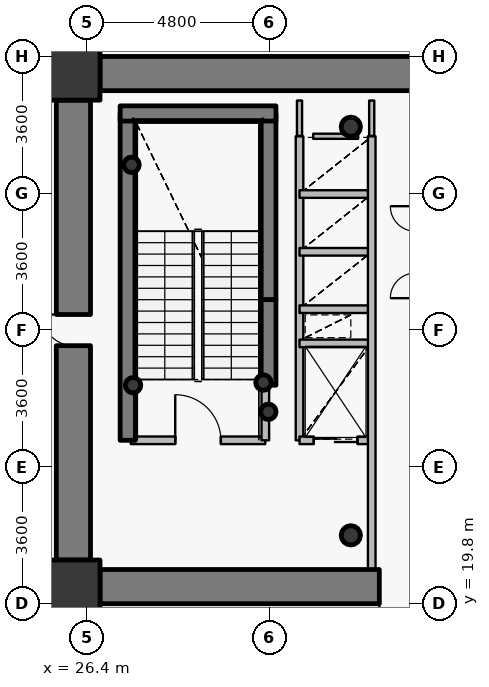
"""IFC4 building model, lengths in metres.
Left out: names, types, materials, properties, quantities, classifications, styles, units other than length and angle.
Written with IfcOpenShell. Run it as: python <this file> out.ifc"""

import sys

from ifc_helpers import new_model, si_unit, direction, frame, frame_2d, origin, origin_2d, place, context, subcontext, project, spatial, rectangle, hollow_circle, extrude, source, transform, mapped, element, fill, save


model = new_model("IFC4")
c1 = context("Model", 3, precision=1e-05, world=origin(), true_north=direction((0.0, 1.0)))
c2 = subcontext(c1, "Body", "Model", "MODEL_VIEW")
j1 = project(units=[si_unit("LENGTHUNIT", "METRE"), si_unit("PLANEANGLEUNIT", "RADIAN")], contexts=[c1])
p1 = place(None, origin())
s1 = spatial("IfcSite", under=j1, at=p1, CompositionType="ELEMENT")
p2 = place(p1, origin())
s2 = spatial("IfcBuilding", under=s1, at=p2, CompositionType="ELEMENT")
p3 = place(p2, frame((0.0, 0.0, 45.0)))
s3 = spatial("IfcBuildingStorey", under=s2, at=p3, CompositionType="ELEMENT", Elevation=45.0)
for number, where, z_axis, x_axis in (
    (1, (26.05, 20.25, 0.0), (0.0, 0.0, 1.0), (1.0, 0.0, 0.0)),
    (2, (26.05, 33.75, 0.0), (0.0, 0.0, 1.0), (1.0, 0.0, 0.0)),
):
    element("IfcColumn", number, at=place(p3, frame(where, z_axis=z_axis, x_axis=x_axis)), inside=s3, PredefinedType="COLUMN", context=c2, shape_type="SweptSolid", body=[
        extrude(rectangle(XDim=1.4, YDim=1.4, at=origin_2d()), origin(), (0.0, 0.0, 1.0), 4.2),
    ])
for number, where, z_axis, x_axis in (
    (3, (33.35, 21.6, 0.0), (0.0, 0.0, 1.0), (1.0, 0.0, 0.0)),
    (4, (33.35, 32.35, 0.0), (0.0, 0.0, 1.0), (1.0, 0.0, 0.0)),
):
    element("IfcColumn", number, at=place(p3, frame(where, z_axis=z_axis, x_axis=x_axis)), inside=s3, PredefinedType="COLUMN", context=c2, shape_type="SweptSolid", body=[
        extrude(hollow_circle(Radius=0.254, WallThickness=0.02, at=origin_2d()), origin(), (0.0, 0.0, 1.0), 4.2),
    ])
p4 = place(p3, frame((27.48, 24.1, 0.0), z_axis=(0.0, 0.0, 1.0), x_axis=(0.0, 1.0, 0.0)))
e5 = element("IfcWall", 5, at=p4, inside=s3, PredefinedType="SHEAR", context=c2, shape_type="SweptSolid", body=[
    extrude(rectangle(XDim=8.6, YDim=0.4, at=frame_2d((4.3, 0.0))), origin(), (0.0, 0.0, 1.0), 4.2),
])
p5 = place(p3, frame((31.18, 27.8, 0.0), z_axis=(0.0, 0.0, 1.0), x_axis=(0.0, 1.0, 0.0)))
e6 = element("IfcWall", 6, at=p5, inside=s3, PredefinedType="SHEAR", context=c2, shape_type="SweptSolid", body=[
    extrude(rectangle(XDim=4.9, YDim=0.4, at=frame_2d((2.45, 0.0))), origin(), (0.0, 0.0, 1.0), 4.2),
])
p6 = place(p3, frame((27.28, 32.7, 0.0), z_axis=(0.0, 0.0, 1.0), x_axis=(1.0, 0.0, 0.0)))
e7 = element("IfcWall", 7, at=p6, inside=s3, PredefinedType="SHEAR", context=c2, shape_type="SweptSolid", body=[
    extrude(rectangle(XDim=4.1, YDim=0.4, at=frame_2d((2.05, 0.0))), origin(), (0.0, 0.0, 1.0), 4.2),
])
for number, where, z_axis, x_axis in (
    (8, (27.58, 31.35, 0.0), (0.0, 0.0, 1.0), (1.0, 0.0, 0.0)),
    (9, (31.05, 25.62, 0.0), (0.0, 0.0, 1.0), (1.0, 0.0, 0.0)),
    (10, (31.18, 24.85, 0.0), (0.0, 0.0, 1.0), (1.0, 0.0, 0.0)),
    (11, (27.62, 25.55, 0.0), (0.0, 0.0, 1.0), (1.0, 0.0, 0.0)),
):
    element("IfcColumn", number, at=place(p3, frame(where, z_axis=z_axis, x_axis=x_axis)), inside=s3, PredefinedType="COLUMN", context=c2, shape_type="SweptSolid", body=[
        extrude(hollow_circle(Radius=0.203, WallThickness=0.016, at=origin_2d()), origin(), (0.0, 0.0, 1.0), 4.2),
    ])
p7 = place(p3, frame((26.75, 33.75, 0.0), z_axis=(0.0, 0.0, 1.0), x_axis=(1.0, 0.0, 0.0)))
e12 = element("IfcWall", 12, at=p7, inside=s3, PredefinedType="SHEAR", context=c2, shape_type="SweptSolid", body=[
    extrude(rectangle(XDim=18.5, YDim=0.9, at=frame_2d((9.25, 0.0))), origin(), (0.0, 0.0, 1.0), 3.4),
])
p8 = place(p3, frame((45.25, 20.25, 0.0), z_axis=(0.0, 0.0, 1.0), x_axis=(-1.0, 0.0, 0.0)))
e13 = element("IfcWall", 13, at=p8, inside=s3, PredefinedType="SHEAR", context=c2, shape_type="SweptSolid", body=[
    extrude(rectangle(XDim=18.5, YDim=0.9, at=frame_2d((9.25, 0.0))), origin(), (0.0, 0.0, 1.0), 3.4),
])
p9 = place(p8, frame((10.0, 0.0, 0.0)))
e14 = element("IfcOpeningElement", 14, at=p9, cuts=e13, PredefinedType="OPENING", context=c2, shape_type="SweptSolid", body=[
    extrude(rectangle(XDim=1.15, YDim=2.15, at=origin_2d()), frame((0.575, 0.46, 1.075), z_axis=(0.0, -1.0, 0.0), x_axis=(1.0, 0.0, 0.0)), (0.0, 0.0, 1.0), 0.92),
])
p10 = place(p3, frame((26.05, 20.95, 0.0), z_axis=(0.0, 0.0, 1.0), x_axis=(0.0, 1.0, 0.0)))
e15 = element("IfcWall", 15, at=p10, inside=s3, PredefinedType="SHEAR", context=c2, shape_type="SweptSolid", body=[
    extrude(rectangle(XDim=12.1, YDim=0.9, at=frame_2d((6.05, 0.0))), origin(), (0.0, 0.0, 1.0), 3.4),
])
p11 = place(p10, frame((5.64, 0.0, 0.0)))
e16 = element("IfcOpeningElement", 16, at=p11, cuts=e15, PredefinedType="OPENING", context=c2, shape_type="SweptSolid", body=[
    extrude(rectangle(XDim=0.82, YDim=2.1, at=origin_2d()), frame((0.41, 0.46, 1.05), z_axis=(0.0, -1.0, 0.0), x_axis=(1.0, 0.0, 0.0)), (0.0, 0.0, 1.0), 0.92),
])
p12 = place(p3, frame((31.18, 25.55, 0.0), z_axis=(0.0, 0.0, 1.0), x_axis=(0.0, 1.0, 0.0)))
e17 = element("IfcWall", 17, at=p12, inside=s3, PredefinedType="SHEAR", context=c2, shape_type="SweptSolid", body=[
    extrude(rectangle(XDim=2.25, YDim=0.4, at=frame_2d((1.125, 0.0))), origin(), (0.0, 0.0, 1.0), 3.55),
])
p13 = place(p3, frame((27.56, 24.1, 0.0), z_axis=(0.0, 0.0, 1.0), x_axis=(1.0, 0.0, 0.0)))
e18 = element("IfcWall", 18, at=p13, inside=s3, PredefinedType="PARTITIONING", context=c2, shape_type="SweptSolid", body=[
    extrude(rectangle(XDim=3.54, YDim=0.2, at=frame_2d((1.77, 0.0))), origin(), (0.0, 0.0, 1.0), 3.95),
])
p14 = place(p13, frame((1.17, 0.0, 0.0)))
e19 = element("IfcOpeningElement", 19, at=p14, cuts=e18, PredefinedType="OPENING", context=c2, shape_type="SweptSolid", body=[
    extrude(rectangle(XDim=1.2, YDim=2.15, at=origin_2d()), frame((0.6, 0.11, 1.075), z_axis=(0.0, -1.0, 0.0), x_axis=(1.0, 0.0, 0.0)), (0.0, 0.0, 1.0), 0.22),
])
p15 = place(p3, frame((31.1, 24.1, 0.0), z_axis=(0.0, 0.0, 1.0), x_axis=(0.0, 1.0, 0.0)))
e20 = element("IfcWall", 20, at=p15, inside=s3, PredefinedType="PARTITIONING", context=c2, shape_type="SweptSolid", body=[
    extrude(rectangle(XDim=1.44, YDim=0.2, at=frame_2d((0.72, 0.0))), origin(), (0.0, 0.0, 1.0), 3.95),
])
p16 = place(p3, frame((32.0, 24.1, 0.0), z_axis=(0.0, 0.0, 1.0), x_axis=(0.0, 1.0, 0.0)))
e21 = element("IfcWall", 21, at=p16, inside=s3, PredefinedType="PARTITIONING", context=c2, shape_type="SweptSolid", body=[
    extrude(rectangle(XDim=8.0, YDim=0.2, at=frame_2d((4.0, 0.0))), origin(), (0.0, 0.0, 1.0), 3.95),
])
p17 = place(p3, frame((32.0, 24.1, 0.0), z_axis=(0.0, 0.0, 1.0), x_axis=(1.0, 0.0, 0.0)))
e22 = element("IfcWall", 22, at=p17, inside=s3, PredefinedType="PARTITIONING", context=c2, shape_type="SweptSolid", body=[
    extrude(rectangle(XDim=1.9, YDim=0.2, at=frame_2d((0.95, 0.0))), origin(), (0.0, 0.0, 1.0), 3.535),
])
p18 = place(p17, frame((0.375, 0.0, 0.0)))
e23 = element("IfcOpeningElement", 23, at=p18, cuts=e22, PredefinedType="OPENING", context=c2, shape_type="SweptSolid", body=[
    extrude(rectangle(XDim=1.15, YDim=2.15, at=origin_2d()), frame((0.575, 0.11, 1.075), z_axis=(0.0, -1.0, 0.0), x_axis=(1.0, 0.0, 0.0)), (0.0, 0.0, 1.0), 0.22),
])
for number, where, z_axis, x_axis in (
    (24, (32.0, 26.65, 0.0), (0.0, 0.0, 1.0), (1.0, 0.0, 0.0)),
    (25, (32.0, 27.55, 0.0), (0.0, 0.0, 1.0), (1.0, 0.0, 0.0)),
    (26, (32.0, 29.06, 0.0), (0.0, 0.0, 1.0), (1.0, 0.0, 0.0)),
    (27, (32.0, 30.58, 0.0), (0.0, 0.0, 1.0), (1.0, 0.0, 0.0)),
):
    element("IfcWall", number, at=place(p3, frame(where, z_axis=z_axis, x_axis=x_axis)), inside=s3, PredefinedType="PARTITIONING", context=c2, shape_type="SweptSolid", body=[
        extrude(rectangle(XDim=1.9, YDim=0.2, at=frame_2d((0.95, 0.0))), origin(), (0.0, 0.0, 1.0), 3.535),
    ])
p19 = place(p3, frame((33.9, 20.7, 0.0), z_axis=(0.0, 0.0, 1.0), x_axis=(0.0, 1.0, 0.0)))
e28 = element("IfcWall", 28, at=p19, inside=s3, PredefinedType="PARTITIONING", context=c2, shape_type="SweptSolid", body=[
    extrude(rectangle(XDim=11.4, YDim=0.2, at=frame_2d((5.7, 0.0))), origin(), (0.0, 0.0, 1.0), 3.535),
])
p20 = place(p3, frame((32.36, 32.1, 0.0), z_axis=(0.0, 0.0, 1.0), x_axis=(1.0, 0.0, 0.0)))
e29 = element("IfcWall", 29, at=p20, inside=s3, PredefinedType="PARTITIONING", context=c2, shape_type="SweptSolid", body=[
    extrude(rectangle(XDim=1.18, YDim=0.135, at=frame_2d((0.59, 0.0))), origin(), (0.0, 0.0, 1.0), 3.535),
])
p21 = place(p3, frame((32.0, 33.04, 0.0), z_axis=(0.0, 0.0, 1.0), x_axis=(0.0, -1.0, 0.0)))
e30 = element("IfcWall", 30, at=p21, inside=s3, PredefinedType="PARTITIONING", context=c2, shape_type="SweptSolid", body=[
    extrude(rectangle(XDim=0.93, YDim=0.135, at=frame_2d((0.465, 0.0))), origin(), (0.0, 0.0, 1.0), 3.485),
])
p22 = place(p3, frame((33.9, 32.11, 0.0), z_axis=(0.0, 0.0, 1.0), x_axis=(0.0, 1.0, 0.0)))
e31 = element("IfcWall", 31, at=p22, inside=s3, PredefinedType="PARTITIONING", context=c2, shape_type="SweptSolid", body=[
    extrude(rectangle(XDim=0.93, YDim=0.135, at=frame_2d((0.465, 0.0))), origin(), (0.0, 0.0, 1.0), 3.535),
])
p23 = place(p3, frame((25.95, 38.893, 0.0), z_axis=(0.0, 0.0, 1.0), x_axis=(0.0, -1.0, 0.0)))
e32 = element("IfcWall", 32, at=p23, inside=s3, PredefinedType="PARTITIONING", context=c2, shape_type="SweptSolid", body=[
    extrude(rectangle(XDim=4.693, YDim=0.135, at=frame_2d((2.346, 0.0))), origin(), (0.0, 0.0, 1.0), 3.285),
])
for number, where, z_axis, x_axis in (
    (33, (25.6, 34.2, 0.0), (0.0, 0.0, 1.0), (0.0, -1.0, 0.0)),
    (34, (25.6, 20.94, 0.0), (0.0, 0.0, 1.0), (0.0, -1.0, 0.0)),
):
    element("IfcWall", number, at=place(p3, frame(where, z_axis=z_axis, x_axis=x_axis)), inside=s3, PredefinedType="PARTITIONING", context=c2, shape_type="SweptSolid", body=[
        extrude(rectangle(XDim=1.14, YDim=0.135, at=frame_2d((0.57, 0.0))), origin(), (0.0, 0.0, 1.0), 3.95),
    ])
p24 = place(p3, frame((25.907, 19.8, 0.0), z_axis=(0.0, 0.0, 1.0), x_axis=(1.0, 0.0, 0.0)))
e35 = element("IfcWall", 35, at=p24, inside=s3, PredefinedType="PARTITIONING", context=c2, shape_type="SweptSolid", body=[
    extrude(rectangle(XDim=0.833, YDim=0.135, at=frame_2d((0.416, 0.0))), origin(), (0.0, 0.0, 1.0), 3.285),
])
m1 = source(origin(), c2, "Body", "SweptSolid", [
    extrude(rectangle(XDim=0.82, YDim=2.1, at=origin_2d()), frame((0.41, 0.025, 1.05), z_axis=(0.0, -1.0, 0.0), x_axis=(1.0, 0.0, 0.0)), (0.0, 0.0, 1.0), 0.05),
])
p25 = place(p11, origin())
e36 = element("IfcDoor", 36, at=p25, inside=s3, OperationType="SINGLE_SWING_RIGHT", PredefinedType="DOOR", context=c2, shape_type="MappedRepresentation", body=[
    mapped(m1, transform((0.0, 0.0, 0.0), x_axis=(1.0, 0.0, 0.0), y_axis=(0.0, 1.0, 0.0), z_axis=(0.0, 0.0, 1.0), scale=1.0)),
])
fill(e16, e36)
m2 = source(origin(), c2, "Body", "SweptSolid", [
    extrude(rectangle(XDim=1.15, YDim=2.15, at=origin_2d()), frame((0.575, 0.025, 1.075), z_axis=(0.0, -1.0, 0.0), x_axis=(1.0, 0.0, 0.0)), (0.0, 0.0, 1.0), 0.05),
])
p26 = place(p9, origin())
e37 = element("IfcDoor", 37, at=p26, inside=s3, OperationType="SINGLE_SWING_RIGHT", PredefinedType="DOOR", context=c2, shape_type="MappedRepresentation", body=[
    mapped(m2, transform((0.0, 0.0, 0.0), x_axis=(1.0, 0.0, 0.0), y_axis=(0.0, 1.0, 0.0), z_axis=(0.0, 0.0, 1.0), scale=1.0)),
])
fill(e14, e37)
m3 = source(origin(), c2, "Body", "SweptSolid", [
    extrude(rectangle(XDim=1.2, YDim=2.15, at=origin_2d()), frame((0.6, 0.025, 1.075), z_axis=(0.0, -1.0, 0.0), x_axis=(1.0, 0.0, 0.0)), (0.0, 0.0, 1.0), 0.05),
])
p27 = place(p14, origin())
e38 = element("IfcDoor", 38, at=p27, inside=s3, OperationType="SINGLE_SWING_LEFT", PredefinedType="DOOR", context=c2, shape_type="MappedRepresentation", body=[
    mapped(m3, transform((0.0, 0.0, 0.0), x_axis=(1.0, 0.0, 0.0), y_axis=(0.0, 1.0, 0.0), z_axis=(0.0, 0.0, 1.0), scale=1.0)),
])
fill(e19, e38)
m4 = source(origin(), c2, "Body", "SweptSolid", [
    extrude(rectangle(XDim=1.15, YDim=2.15, at=origin_2d()), frame((0.575, 0.025, 1.075), z_axis=(0.0, -1.0, 0.0), x_axis=(1.0, 0.0, 0.0)), (0.0, 0.0, 1.0), 0.05),
])
p28 = place(p18, origin())
e39 = element("IfcDoor", 39, at=p28, inside=s3, OperationType="DOUBLE_DOOR_SLIDING", PredefinedType="USERDEFINED", context=c2, shape_type="MappedRepresentation", body=[
    mapped(m4, transform((0.0, 0.0, 0.0), x_axis=(1.0, 0.0, 0.0), y_axis=(0.0, 1.0, 0.0), z_axis=(0.0, 0.0, 1.0), scale=1.0)),
])
fill(e23, e39)
save(model, sys.argv[1])
